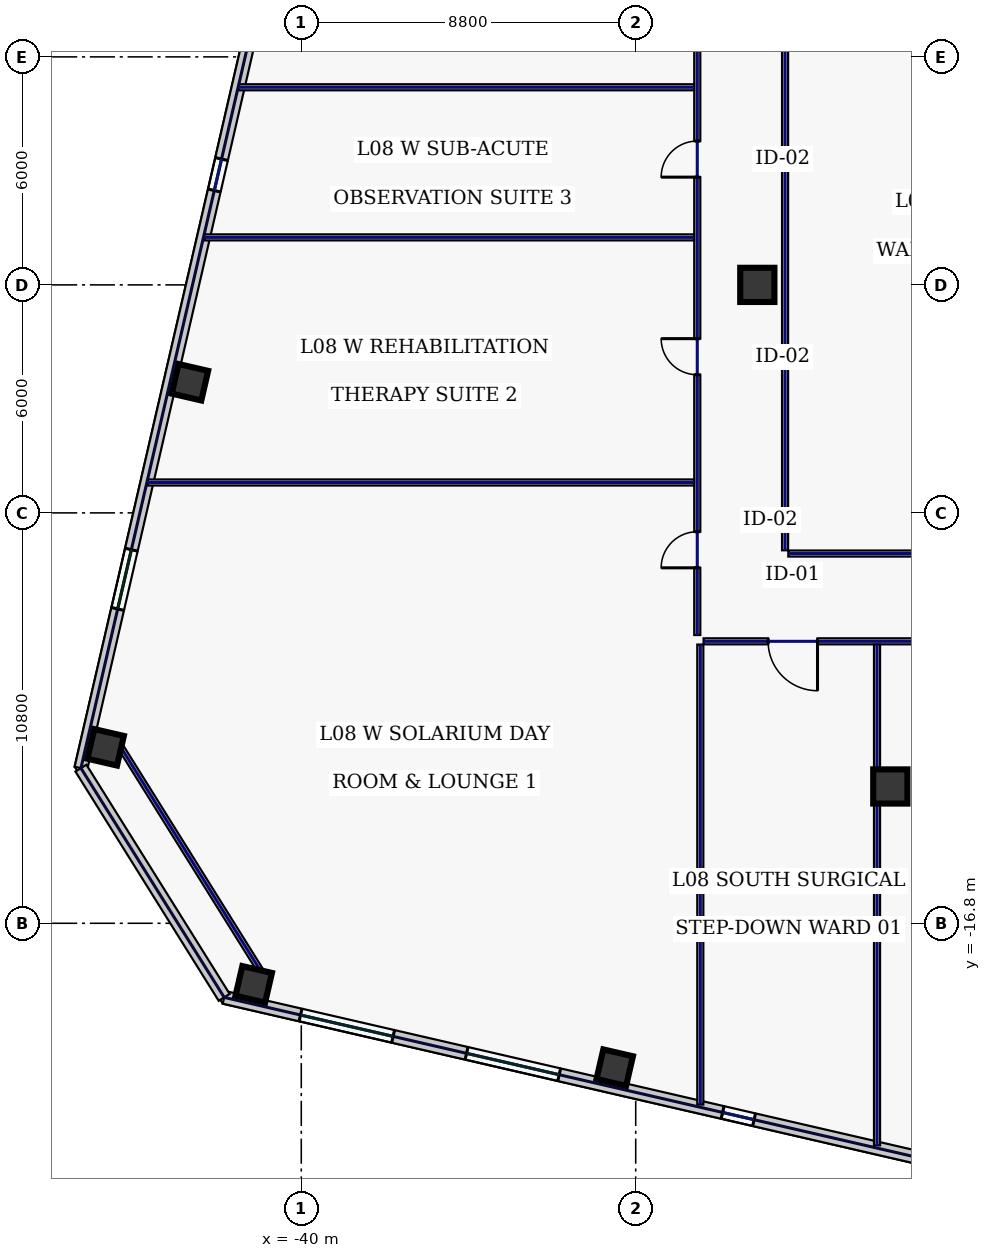
"""IFC4 building model, lengths in metres.
Left out: names, types, materials, properties, quantities, classifications, styles, units other than length and angle.
Written with IfcOpenShell. Run it as: python <this file> out.ifc"""

import sys

from ifc_helpers import new_model, si_unit, direction, frame, frame_2d, origin, origin_2d, place, context, subcontext, project, spatial, rectangle, hollow_rectangle, extrude, element, fill, save


model = new_model("IFC4")
c1 = context("Model", 3, precision=1e-05, world=origin(), true_north=direction((0.0, 1.0)))
c2 = subcontext(c1, "Body", "Model", "MODEL_VIEW")
j1 = project(units=[si_unit("LENGTHUNIT", "METRE"), si_unit("PLANEANGLEUNIT", "RADIAN")], contexts=[c1])
p1 = place(None, origin())
s1 = spatial("IfcSite", under=j1, at=p1, CompositionType="ELEMENT")
p2 = place(p1, origin())
s2 = spatial("IfcBuilding", under=s1, at=p2, CompositionType="ELEMENT")
p3 = place(p2, frame((0.0, 0.0, 43.4)))
s3 = spatial("IfcBuildingStorey", under=s2, at=p3, CompositionType="ELEMENT", Elevation=43.4)
for number, where, z_axis, x_axis in (
    (1, (-24.5, -13.2, 0.0), (0.0, 0.0, 1.0), (1.0, 0.0, 0.0)),
    (2, (-28.0, 0.0, 0.0), (0.0, 0.0, 1.0), (1.0, 0.0, 0.0)),
):
    element("IfcColumn", number, at=place(p3, frame(where, z_axis=z_axis, x_axis=x_axis)), inside=s3, PredefinedType="COLUMN", context=c2, shape_type="SweptSolid", body=[
        extrude(hollow_rectangle(XDim=0.9, YDim=0.9, WallThickness=0.04, at=origin_2d()), origin(), (0.0, 0.0, 1.0), 3.74),
    ])
for number, where, z_axis, x_axis in (
    (3, (-41.251, -18.406, 0.0), (0.0, 0.0, 1.0), (0.974, -0.225, 0.0)),
    (4, (-31.752, -20.599, 0.0), (0.0, 0.0, 1.0), (0.974, -0.225, 0.0)),
    (5, (-42.93, -2.562, 0.0), (0.0, 0.0, 1.0), (0.974, -0.225, 0.0)),
    (6, (-45.148, -12.169, 0.0), (0.0, 0.0, 1.0), (0.974, -0.225, 0.0)),
):
    element("IfcColumn", number, at=place(p3, frame(where, z_axis=z_axis, x_axis=x_axis)), inside=s3, PredefinedType="COLUMN", context=c2, shape_type="SweptSolid", body=[
        extrude(hollow_rectangle(XDim=0.8, YDim=0.8, WallThickness=0.036, at=origin_2d()), origin(), (0.0, 0.0, 1.0), 3.74),
    ])
p4 = place(p3, frame((-42.029, -18.75, 0.0), z_axis=(0.0, 0.0, 1.0), x_axis=(0.974371399361, -0.224945273581, 0.0)))
e7 = element("IfcWall", 7, at=p4, inside=s3, PredefinedType="STANDARD", context=c2, shape_type="SweptSolid", body=[
    extrude(rectangle(XDim=19.75, YDim=0.34, at=frame_2d((9.875, 0.0))), origin(), (0.0, 0.0, 1.0), 3.74),
])
p5 = place(p4, frame((2.062, 0.0, 0.72)))
e8 = element("IfcOpeningElement", 8, at=p5, cuts=e7, PredefinedType="OPENING", context=c2, shape_type="SweptSolid", body=[
    extrude(rectangle(XDim=2.5, YDim=2.15, at=frame_2d((1.25, 1.075))), frame((0.0, 0.18, 0.0), z_axis=(0.0, -1.0, 0.0), x_axis=(1.0, 0.0, 0.0)), (0.0, 0.0, 1.0), 0.36),
])
p6 = place(p4, frame((6.546, 0.0, 0.72)))
e9 = element("IfcOpeningElement", 9, at=p6, cuts=e7, PredefinedType="OPENING", context=c2, shape_type="SweptSolid", body=[
    extrude(rectangle(XDim=2.5, YDim=2.15, at=frame_2d((1.25, 1.075))), frame((0.0, 0.18, 0.0), z_axis=(0.0, -1.0, 0.0), x_axis=(1.0, 0.0, 0.0)), (0.0, 0.0, 1.0), 0.36),
])
p7 = place(p4, frame((13.461, 0.0, 0.72)))
e10 = element("IfcOpeningElement", 10, at=p7, cuts=e7, PredefinedType="OPENING", context=c2, shape_type="SweptSolid", body=[
    extrude(rectangle(XDim=0.85, YDim=1.85, at=frame_2d((0.425, 0.925))), frame((0.0, 0.18, 0.0), z_axis=(0.0, -1.0, 0.0), x_axis=(1.0, 0.0, 0.0)), (0.0, 0.0, 1.0), 0.36),
])
p8 = place(p3, frame((-36.62, 27.037, 0.0), z_axis=(0.0, 0.0, 1.0), x_axis=(-0.224951280646, -0.974370012539, 0.0)))
e11 = element("IfcWall", 11, at=p8, inside=s3, PredefinedType="STANDARD", context=c2, shape_type="SweptSolid", body=[
    extrude(rectangle(XDim=40.8, YDim=0.34, at=frame_2d((20.4, 0.0))), origin(), (0.0, 0.0, 1.0), 3.74),
])
p9 = place(p8, frame((4.3, 0.0, 0.58)))
e12 = element("IfcOpeningElement", 12, at=p9, cuts=e11, PredefinedType="OPENING", context=c2, shape_type="SweptSolid", body=[
    extrude(rectangle(XDim=1.6, YDim=2.3, at=frame_2d((0.8, 1.15))), frame((0.0, 0.18, 0.0), z_axis=(0.0, -1.0, 0.0), x_axis=(1.0, 0.0, 0.0)), (0.0, 0.0, 1.0), 0.36),
])
p10 = place(p8, frame((14.5, 0.0, 0.58)))
e13 = element("IfcOpeningElement", 13, at=p10, cuts=e11, PredefinedType="OPENING", context=c2, shape_type="SweptSolid", body=[
    extrude(rectangle(XDim=1.6, YDim=2.3, at=frame_2d((0.8, 1.15))), frame((0.0, 0.18, 0.0), z_axis=(0.0, -1.0, 0.0), x_axis=(1.0, 0.0, 0.0)), (0.0, 0.0, 1.0), 0.36),
])
p11 = place(p8, frame((24.35, 0.0, 0.75)))
e14 = element("IfcOpeningElement", 14, at=p11, cuts=e11, PredefinedType="OPENING", context=c2, shape_type="SweptSolid", body=[
    extrude(rectangle(XDim=0.85, YDim=1.85, at=frame_2d((0.425, 0.925))), frame((0.0, 0.18, 0.0), z_axis=(0.0, -1.0, 0.0), x_axis=(1.0, 0.0, 0.0)), (0.0, 0.0, 1.0), 0.36),
])
p12 = place(p8, frame((34.9, 0.0, 0.58)))
e15 = element("IfcOpeningElement", 15, at=p12, cuts=e11, PredefinedType="OPENING", context=c2, shape_type="SweptSolid", body=[
    extrude(rectangle(XDim=1.6, YDim=2.3, at=frame_2d((0.8, 1.15))), frame((0.0, 0.18, 0.0), z_axis=(0.0, -1.0, 0.0), x_axis=(1.0, 0.0, 0.0)), (0.0, 0.0, 1.0), 0.36),
])
p13 = place(p3, frame((-45.798, -12.717, 0.0), z_axis=(0.0, 0.0, 1.0), x_axis=(0.529906387556, -0.848056142261, 0.0)))
e16 = element("IfcWall", 16, at=p13, inside=s3, PredefinedType="STANDARD", context=c2, shape_type="SweptSolid", body=[
    extrude(rectangle(XDim=7.114, YDim=0.34, at=frame_2d((3.557, 0.0))), origin(), (0.0, 0.0, 1.0), 3.74),
])
p14 = place(p3, frame((-44.86, -11.989, 0.0), z_axis=(0.0, 0.0, 1.0), x_axis=(0.52991239767, -0.848052386823, 0.0)))
e17 = element("IfcWall", 17, at=p14, inside=s3, PredefinedType="PARTITIONING", context=c2, shape_type="SweptSolid", body=[
    extrude(rectangle(XDim=7.354, YDim=0.16, at=frame_2d((3.677, 0.0))), origin(), (0.0, 0.0, 1.0), 3.74),
])
p15 = place(p3, frame((-29.58, -9.215, 0.0), z_axis=(0.0, 0.0, 1.0), x_axis=(0.0, 1.0, 0.0)))
e18 = element("IfcWall", 18, at=p15, inside=s3, PredefinedType="PARTITIONING", context=c2, shape_type="SweptSolid", body=[
    extrude(rectangle(XDim=18.63, YDim=0.16, at=frame_2d((9.315, 0.0))), origin(), (0.0, 0.0, 1.0), 3.74),
])
p16 = place(p15, frame((1.769, 0.0, 0.0)))
e19 = element("IfcOpeningElement", 19, at=p16, cuts=e18, PredefinedType="OPENING", context=c2, shape_type="SweptSolid", body=[
    extrude(rectangle(XDim=0.95, YDim=2.2, at=frame_2d((0.475, 1.1))), frame((0.0, 0.09, 0.0), z_axis=(0.0, -1.0, 0.0), x_axis=(1.0, 0.0, 0.0)), (0.0, 0.0, 1.0), 0.18),
])
p17 = place(p15, frame((6.85, 0.0, 0.0)))
e20 = element("IfcOpeningElement", 20, at=p17, cuts=e18, PredefinedType="OPENING", context=c2, shape_type="SweptSolid", body=[
    extrude(rectangle(XDim=0.95, YDim=2.2, at=frame_2d((0.475, 1.1))), frame((0.0, 0.09, 0.0), z_axis=(0.0, -1.0, 0.0), x_axis=(1.0, 0.0, 0.0)), (0.0, 0.0, 1.0), 0.18),
])
p18 = place(p15, frame((12.05, 0.0, 0.0)))
e21 = element("IfcOpeningElement", 21, at=p18, cuts=e18, PredefinedType="OPENING", context=c2, shape_type="SweptSolid", body=[
    extrude(rectangle(XDim=0.95, YDim=2.2, at=frame_2d((0.475, 1.1))), frame((0.0, 0.09, 0.0), z_axis=(0.0, -1.0, 0.0), x_axis=(1.0, 0.0, 0.0)), (0.0, 0.0, 1.0), 0.18),
])
p19 = place(p15, frame((15.981, 0.0, 0.0)))
e22 = element("IfcOpeningElement", 22, at=p19, cuts=e18, PredefinedType="OPENING", context=c2, shape_type="SweptSolid", body=[
    extrude(rectangle(XDim=0.95, YDim=2.2, at=frame_2d((0.475, 1.1))), frame((0.0, 0.09, 0.0), z_axis=(0.0, -1.0, 0.0), x_axis=(1.0, 0.0, 0.0)), (0.0, 0.0, 1.0), 0.18),
])
p20 = place(p3, frame((29.415, -9.38, 0.0), z_axis=(0.0, 0.0, 1.0), x_axis=(-1.0, 0.0, 0.0)))
e23 = element("IfcWall", 23, at=p20, inside=s3, PredefinedType="PARTITIONING", context=c2, shape_type="SweptSolid", body=[
    extrude(rectangle(XDim=58.83, YDim=0.16, at=frame_2d((29.415, 0.0))), origin(), (0.0, 0.0, 1.0), 3.74),
])
p21 = place(p20, frame((55.831, 0.0, 0.0)))
e24 = element("IfcOpeningElement", 24, at=p21, cuts=e23, PredefinedType="OPENING", context=c2, shape_type="SweptSolid", body=[
    extrude(rectangle(XDim=1.3, YDim=2.2, at=frame_2d((0.65, 1.1))), frame((0.0, 0.09, 0.0), z_axis=(0.0, -1.0, 0.0), x_axis=(1.0, 0.0, 0.0)), (0.0, 0.0, 1.0), 0.18),
])
p22 = place(p20, frame((49.738, 0.0, 0.0)))
e25 = element("IfcOpeningElement", 25, at=p22, cuts=e23, PredefinedType="OPENING", context=c2, shape_type="SweptSolid", body=[
    extrude(rectangle(XDim=1.05, YDim=2.2, at=frame_2d((0.525, 1.1))), frame((0.0, 0.09, 0.0), z_axis=(0.0, -1.0, 0.0), x_axis=(1.0, 0.0, 0.0)), (0.0, 0.0, 1.0), 0.18),
])
p23 = place(p20, frame((45.512, 0.0, 0.0)))
e26 = element("IfcOpeningElement", 26, at=p23, cuts=e23, PredefinedType="OPENING", context=c2, shape_type="SweptSolid", body=[
    extrude(rectangle(XDim=0.95, YDim=2.2, at=frame_2d((0.475, 1.1))), frame((0.0, 0.09, 0.0), z_axis=(0.0, -1.0, 0.0), x_axis=(1.0, 0.0, 0.0)), (0.0, 0.0, 1.0), 0.18),
])
p24 = place(p20, frame((38.665, 0.0, 0.0)))
e27 = element("IfcOpeningElement", 27, at=p24, cuts=e23, PredefinedType="OPENING", context=c2, shape_type="SweptSolid", body=[
    extrude(rectangle(XDim=0.95, YDim=2.2, at=frame_2d((0.475, 1.1))), frame((0.0, 0.09, 0.0), z_axis=(0.0, -1.0, 0.0), x_axis=(1.0, 0.0, 0.0)), (0.0, 0.0, 1.0), 0.18),
])
p25 = place(p20, frame((32.575, 0.0, 0.0)))
e28 = element("IfcOpeningElement", 28, at=p25, cuts=e23, PredefinedType="OPENING", context=c2, shape_type="SweptSolid", body=[
    extrude(rectangle(XDim=0.95, YDim=2.2, at=frame_2d((0.475, 1.1))), frame((0.0, 0.09, 0.0), z_axis=(0.0, -1.0, 0.0), x_axis=(1.0, 0.0, 0.0)), (0.0, 0.0, 1.0), 0.18),
])
p26 = place(p20, frame((28.125, 0.0, 0.0)))
e29 = element("IfcOpeningElement", 29, at=p26, cuts=e23, PredefinedType="OPENING", context=c2, shape_type="SweptSolid", body=[
    extrude(rectangle(XDim=0.95, YDim=2.2, at=frame_2d((0.475, 1.1))), frame((0.0, 0.09, 0.0), z_axis=(0.0, -1.0, 0.0), x_axis=(1.0, 0.0, 0.0)), (0.0, 0.0, 1.0), 0.18),
])
p27 = place(p20, frame((23.5, 0.0, 0.0)))
e30 = element("IfcOpeningElement", 30, at=p27, cuts=e23, PredefinedType="OPENING", context=c2, shape_type="SweptSolid", body=[
    extrude(rectangle(XDim=1.3, YDim=2.2, at=frame_2d((0.65, 1.1))), frame((0.0, 0.09, 0.0), z_axis=(0.0, -1.0, 0.0), x_axis=(1.0, 0.0, 0.0)), (0.0, 0.0, 1.0), 0.18),
])
p28 = place(p20, frame((19.05, 0.0, 0.0)))
e31 = element("IfcOpeningElement", 31, at=p28, cuts=e23, PredefinedType="OPENING", context=c2, shape_type="SweptSolid", body=[
    extrude(rectangle(XDim=1.45, YDim=2.2, at=frame_2d((0.725, 1.1))), frame((0.0, 0.09, 0.0), z_axis=(0.0, -1.0, 0.0), x_axis=(1.0, 0.0, 0.0)), (0.0, 0.0, 1.0), 0.18),
])
p29 = place(p20, frame((14.8, 0.0, 0.0)))
e32 = element("IfcOpeningElement", 32, at=p29, cuts=e23, PredefinedType="OPENING", context=c2, shape_type="SweptSolid", body=[
    extrude(rectangle(XDim=1.3, YDim=2.2, at=frame_2d((0.65, 1.1))), frame((0.0, 0.09, 0.0), z_axis=(0.0, -1.0, 0.0), x_axis=(1.0, 0.0, 0.0)), (0.0, 0.0, 1.0), 0.18),
])
p30 = place(p20, frame((10.925, 0.0, 0.0)))
e33 = element("IfcOpeningElement", 33, at=p30, cuts=e23, PredefinedType="OPENING", context=c2, shape_type="SweptSolid", body=[
    extrude(rectangle(XDim=0.95, YDim=2.2, at=frame_2d((0.475, 1.1))), frame((0.0, 0.09, 0.0), z_axis=(0.0, -1.0, 0.0), x_axis=(1.0, 0.0, 0.0)), (0.0, 0.0, 1.0), 0.18),
])
p31 = place(p20, frame((6.65, 0.0, 0.0)))
e34 = element("IfcOpeningElement", 34, at=p31, cuts=e23, PredefinedType="OPENING", context=c2, shape_type="SweptSolid", body=[
    extrude(rectangle(XDim=0.95, YDim=2.2, at=frame_2d((0.475, 1.1))), frame((0.0, 0.09, 0.0), z_axis=(0.0, -1.0, 0.0), x_axis=(1.0, 0.0, 0.0)), (0.0, 0.0, 1.0), 0.18),
])
p32 = place(p20, frame((2.044, 0.0, 0.0)))
e35 = element("IfcOpeningElement", 35, at=p32, cuts=e23, PredefinedType="OPENING", context=c2, shape_type="SweptSolid", body=[
    extrude(rectangle(XDim=1.05, YDim=2.2, at=frame_2d((0.525, 1.1))), frame((0.0, 0.09, 0.0), z_axis=(0.0, -1.0, 0.0), x_axis=(1.0, 0.0, 0.0)), (0.0, 0.0, 1.0), 0.18),
])
p33 = place(p3, frame((-27.27, 7.185, 0.0), z_axis=(0.0, 0.0, 1.0), x_axis=(0.0, -1.0, 0.0)))
e36 = element("IfcWall", 36, at=p33, inside=s3, PredefinedType="PARTITIONING", context=c2, shape_type="SweptSolid", body=[
    extrude(rectangle(XDim=14.17, YDim=0.16, at=frame_2d((7.085, 0.0))), origin(), (0.0, 0.0, 1.0), 3.74),
])
p34 = place(p3, frame((-27.185, -7.07, 0.0), z_axis=(0.0, 0.0, 1.0), x_axis=(1.0, 0.0, 0.0)))
e37 = element("IfcWall", 37, at=p34, inside=s3, PredefinedType="PARTITIONING", context=c2, shape_type="SweptSolid", body=[
    extrude(rectangle(XDim=16.52, YDim=0.16, at=frame_2d((8.26, 0.0))), origin(), (0.0, 0.0, 1.0), 3.74),
])
p35 = place(p3, frame((-29.5, -21.571, 0.0), z_axis=(0.0, 0.0, 1.0), x_axis=(0.0, 1.0, 0.0)))
e38 = element("IfcWall", 38, at=p35, inside=s3, PredefinedType="PARTITIONING", context=c2, shape_type="SweptSolid", body=[
    extrude(rectangle(XDim=12.105, YDim=0.16, at=frame_2d((6.053, 0.0))), origin(), (0.0, 0.0, 1.0), 3.74),
])
p36 = place(p3, frame((-24.85, -22.644, 0.0), z_axis=(0.0, 0.0, 1.0), x_axis=(0.0, 1.0, 0.0)))
e39 = element("IfcWall", 39, at=p36, inside=s3, PredefinedType="PARTITIONING", context=c2, shape_type="SweptSolid", body=[
    extrude(rectangle(XDim=13.179, YDim=0.16, at=frame_2d((6.589, 0.0))), origin(), (0.0, 0.0, 1.0), 3.74),
])
p37 = place(p3, frame((-44.042, -5.2, 0.0), z_axis=(0.0, 0.0, 1.0), x_axis=(1.0, 0.0, 0.0)))
e40 = element("IfcWall", 40, at=p37, inside=s3, PredefinedType="PARTITIONING", context=c2, shape_type="SweptSolid", body=[
    extrude(rectangle(XDim=14.377, YDim=0.16, at=frame_2d((7.188, 0.0))), origin(), (0.0, 0.0, 1.0), 3.74),
])
p38 = place(p3, frame((-42.553, 1.25, 0.0), z_axis=(0.0, 0.0, 1.0), x_axis=(1.0, 0.0, 0.0)))
e41 = element("IfcWall", 41, at=p38, inside=s3, PredefinedType="PARTITIONING", context=c2, shape_type="SweptSolid", body=[
    extrude(rectangle(XDim=12.888, YDim=0.16, at=frame_2d((6.444, 0.0))), origin(), (0.0, 0.0, 1.0), 3.74),
])
p39 = place(p3, frame((-41.641, 5.2, 0.0), z_axis=(0.0, 0.0, 1.0), x_axis=(1.0, 0.0, 0.0)))
e42 = element("IfcWall", 42, at=p39, inside=s3, PredefinedType="PARTITIONING", context=c2, shape_type="SweptSolid", body=[
    extrude(rectangle(XDim=11.976, YDim=0.16, at=frame_2d((5.988, 0.0))), origin(), (0.0, 0.0, 1.0), 3.74),
])
p40 = place(p5, origin())
e43 = element("IfcWindow", 43, at=p40, inside=s3, PartitioningType="SINGLE_PANEL", PredefinedType="WINDOW", context=c2, shape_type="SweptSolid", body=[
    extrude(rectangle(XDim=2.5, YDim=2.15, at=frame_2d((1.25, 1.075))), frame((0.0, 0.03, 0.0), z_axis=(0.0, -1.0, 0.0), x_axis=(1.0, 0.0, 0.0)), (0.0, 0.0, 1.0), 0.06),
])
fill(e8, e43)
p41 = place(p6, origin())
e44 = element("IfcWindow", 44, at=p41, inside=s3, PartitioningType="SINGLE_PANEL", PredefinedType="WINDOW", context=c2, shape_type="SweptSolid", body=[
    extrude(rectangle(XDim=2.5, YDim=2.15, at=frame_2d((1.25, 1.075))), frame((0.0, 0.03, 0.0), z_axis=(0.0, -1.0, 0.0), x_axis=(1.0, 0.0, 0.0)), (0.0, 0.0, 1.0), 0.06),
])
fill(e9, e44)
p42 = place(p7, origin())
e45 = element("IfcWindow", 45, at=p42, inside=s3, PartitioningType="SINGLE_PANEL", PredefinedType="WINDOW", context=c2, shape_type="SweptSolid", body=[
    extrude(rectangle(XDim=0.85, YDim=1.85, at=frame_2d((0.425, 0.925))), frame((0.0, 0.03, 0.0), z_axis=(0.0, -1.0, 0.0), x_axis=(1.0, 0.0, 0.0)), (0.0, 0.0, 1.0), 0.06),
])
fill(e10, e45)
p43 = place(p11, origin())
e46 = element("IfcWindow", 46, at=p43, inside=s3, PartitioningType="SINGLE_PANEL", PredefinedType="WINDOW", context=c2, shape_type="SweptSolid", body=[
    extrude(rectangle(XDim=0.85, YDim=1.85, at=frame_2d((0.425, 0.925))), frame((0.0, 0.03, 0.0), z_axis=(0.0, -1.0, 0.0), x_axis=(1.0, 0.0, 0.0)), (0.0, 0.0, 1.0), 0.06),
])
fill(e14, e46)
p44 = place(p12, origin())
e47 = element("IfcWindow", 47, at=p44, inside=s3, PartitioningType="SINGLE_PANEL", PredefinedType="WINDOW", context=c2, shape_type="SweptSolid", body=[
    extrude(rectangle(XDim=1.6, YDim=2.3, at=frame_2d((0.8, 1.15))), frame((0.0, 0.03, 0.0), z_axis=(0.0, -1.0, 0.0), x_axis=(1.0, 0.0, 0.0)), (0.0, 0.0, 1.0), 0.06),
])
fill(e15, e47)
p45 = place(p21, origin())
e48 = element("IfcDoor", 48, at=p45, inside=s3, OperationType="SINGLE_SWING_LEFT", PredefinedType="DOOR", context=c2, shape_type="SweptSolid", body=[
    extrude(rectangle(XDim=1.3, YDim=2.2, at=frame_2d((0.65, 1.1))), frame((0.0, 0.025, 0.0), z_axis=(0.0, -1.0, 0.0), x_axis=(1.0, 0.0, 0.0)), (0.0, 0.0, 1.0), 0.05),
])
fill(e24, e48)
p46 = place(p16, origin())
e49 = element("IfcDoor", 49, at=p46, inside=s3, OperationType="SINGLE_SWING_LEFT", PredefinedType="DOOR", context=c2, shape_type="SweptSolid", body=[
    extrude(rectangle(XDim=0.95, YDim=2.2, at=frame_2d((0.475, 1.1))), frame((0.0, 0.025, 0.0), z_axis=(0.0, -1.0, 0.0), x_axis=(1.0, 0.0, 0.0)), (0.0, 0.0, 1.0), 0.05),
])
fill(e19, e49)
p47 = place(p17, origin())
e50 = element("IfcDoor", 50, at=p47, inside=s3, OperationType="SINGLE_SWING_RIGHT", PredefinedType="DOOR", context=c2, shape_type="SweptSolid", body=[
    extrude(rectangle(XDim=0.95, YDim=2.2, at=frame_2d((0.475, 1.1))), frame((0.0, 0.025, 0.0), z_axis=(0.0, -1.0, 0.0), x_axis=(1.0, 0.0, 0.0)), (0.0, 0.0, 1.0), 0.05),
])
fill(e20, e50)
p48 = place(p18, origin())
e51 = element("IfcDoor", 51, at=p48, inside=s3, OperationType="SINGLE_SWING_LEFT", PredefinedType="DOOR", context=c2, shape_type="SweptSolid", body=[
    extrude(rectangle(XDim=0.95, YDim=2.2, at=frame_2d((0.475, 1.1))), frame((0.0, 0.025, 0.0), z_axis=(0.0, -1.0, 0.0), x_axis=(1.0, 0.0, 0.0)), (0.0, 0.0, 1.0), 0.05),
])
fill(e21, e51)
save(model, sys.argv[1])
